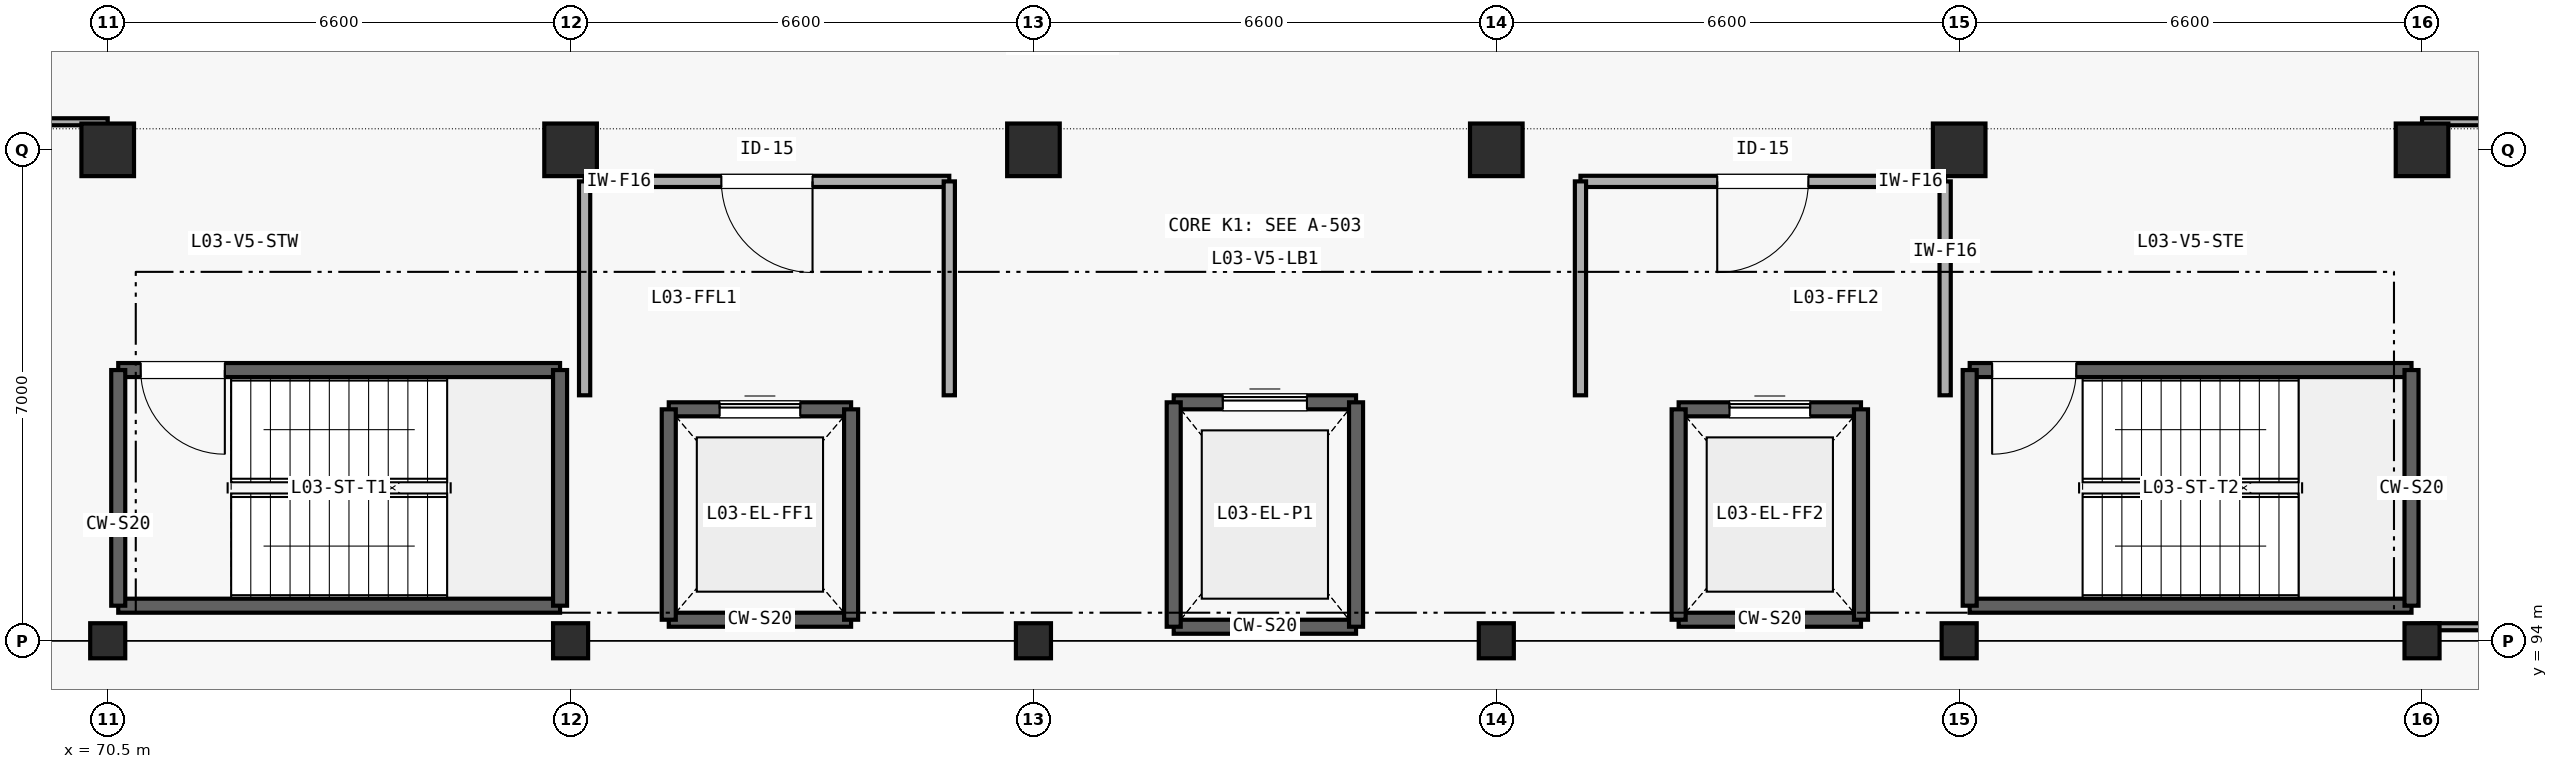
"""IFC4 building model, lengths in metres.
Left out: names, types, materials, properties, quantities, classifications, styles, units other than length and angle.
Written with IfcOpenShell. Run it as: python <this file> out.ifc"""

import sys

from ifc_helpers import new_model, si_unit, direction, frame, frame_2d, origin, origin_2d, place, context, subcontext, project, spatial, rectangle, extrude, element, fill, save


model = new_model("IFC4")
c1 = context("Model", 3, precision=1e-05, world=origin(), true_north=direction((0.0, 1.0)))
c2 = subcontext(c1, "Body", "Model", "MODEL_VIEW")
j1 = project(units=[si_unit("LENGTHUNIT", "METRE"), si_unit("PLANEANGLEUNIT", "RADIAN")], contexts=[c1])
p1 = place(None, origin())
s1 = spatial("IfcSite", under=j1, at=p1, CompositionType="ELEMENT")
p2 = place(p1, origin())
s2 = spatial("IfcBuilding", under=s1, at=p2, CompositionType="ELEMENT")
p3 = place(p2, frame((0.0, 0.0, 12.6)))
s3 = spatial("IfcBuildingStorey", under=s2, at=p3, CompositionType="ELEMENT", Elevation=12.6)
p4 = place(p3, frame((70.5, 94.0, 0.0), z_axis=(0.0, 0.0, 1.0), x_axis=(1.0, 0.0, 0.0)))
e1 = element("IfcColumn", 1, at=p4, inside=s3, PredefinedType="COLUMN", context=c2, shape_type="SweptSolid", body=[
    extrude(rectangle(XDim=0.5, YDim=0.5, at=origin_2d()), origin(), (0.0, 0.0, 1.0), 4.2),
])
p5 = place(p3, frame((70.5, 101.0, 0.0), z_axis=(0.0, 0.0, 1.0), x_axis=(1.0, 0.0, 0.0)))
e2 = element("IfcColumn", 2, at=p5, inside=s3, PredefinedType="COLUMN", context=c2, shape_type="SweptSolid", body=[
    extrude(rectangle(XDim=0.75, YDim=0.75, at=origin_2d()), origin(), (0.0, 0.0, 1.0), 4.2),
])
p6 = place(p3, frame((77.1, 94.0, 0.0), z_axis=(0.0, 0.0, 1.0), x_axis=(1.0, 0.0, 0.0)))
e3 = element("IfcColumn", 3, at=p6, inside=s3, PredefinedType="COLUMN", context=c2, shape_type="SweptSolid", body=[
    extrude(rectangle(XDim=0.5, YDim=0.5, at=origin_2d()), origin(), (0.0, 0.0, 1.0), 4.2),
])
p7 = place(p3, frame((77.1, 101.0, 0.0), z_axis=(0.0, 0.0, 1.0), x_axis=(1.0, 0.0, 0.0)))
e4 = element("IfcColumn", 4, at=p7, inside=s3, PredefinedType="COLUMN", context=c2, shape_type="SweptSolid", body=[
    extrude(rectangle(XDim=0.75, YDim=0.75, at=origin_2d()), origin(), (0.0, 0.0, 1.0), 4.2),
])
p8 = place(p3, frame((83.7, 94.0, 0.0), z_axis=(0.0, 0.0, 1.0), x_axis=(1.0, 0.0, 0.0)))
e5 = element("IfcColumn", 5, at=p8, inside=s3, PredefinedType="COLUMN", context=c2, shape_type="SweptSolid", body=[
    extrude(rectangle(XDim=0.5, YDim=0.5, at=origin_2d()), origin(), (0.0, 0.0, 1.0), 4.2),
])
p9 = place(p3, frame((83.7, 101.0, 0.0), z_axis=(0.0, 0.0, 1.0), x_axis=(1.0, 0.0, 0.0)))
e6 = element("IfcColumn", 6, at=p9, inside=s3, PredefinedType="COLUMN", context=c2, shape_type="SweptSolid", body=[
    extrude(rectangle(XDim=0.75, YDim=0.75, at=origin_2d()), origin(), (0.0, 0.0, 1.0), 4.2),
])
p10 = place(p3, frame((90.3, 94.0, 0.0), z_axis=(0.0, 0.0, 1.0), x_axis=(1.0, 0.0, 0.0)))
e7 = element("IfcColumn", 7, at=p10, inside=s3, PredefinedType="COLUMN", context=c2, shape_type="SweptSolid", body=[
    extrude(rectangle(XDim=0.5, YDim=0.5, at=origin_2d()), origin(), (0.0, 0.0, 1.0), 4.2),
])
p11 = place(p3, frame((90.3, 101.0, 0.0), z_axis=(0.0, 0.0, 1.0), x_axis=(1.0, 0.0, 0.0)))
e8 = element("IfcColumn", 8, at=p11, inside=s3, PredefinedType="COLUMN", context=c2, shape_type="SweptSolid", body=[
    extrude(rectangle(XDim=0.75, YDim=0.75, at=origin_2d()), origin(), (0.0, 0.0, 1.0), 4.2),
])
p12 = place(p3, frame((96.9, 94.0, 0.0), z_axis=(0.0, 0.0, 1.0), x_axis=(1.0, 0.0, 0.0)))
e9 = element("IfcColumn", 9, at=p12, inside=s3, PredefinedType="COLUMN", context=c2, shape_type="SweptSolid", body=[
    extrude(rectangle(XDim=0.5, YDim=0.5, at=origin_2d()), origin(), (0.0, 0.0, 1.0), 4.2),
])
p13 = place(p3, frame((96.9, 101.0, 0.0), z_axis=(0.0, 0.0, 1.0), x_axis=(1.0, 0.0, 0.0)))
e10 = element("IfcColumn", 10, at=p13, inside=s3, PredefinedType="COLUMN", context=c2, shape_type="SweptSolid", body=[
    extrude(rectangle(XDim=0.75, YDim=0.75, at=origin_2d()), origin(), (0.0, 0.0, 1.0), 4.2),
])
p14 = place(p3, frame((103.5, 94.0, 0.0), z_axis=(0.0, 0.0, 1.0), x_axis=(1.0, 0.0, 0.0)))
e11 = element("IfcColumn", 11, at=p14, inside=s3, PredefinedType="COLUMN", context=c2, shape_type="SweptSolid", body=[
    extrude(rectangle(XDim=0.5, YDim=0.5, at=origin_2d()), origin(), (0.0, 0.0, 1.0), 4.2),
])
p15 = place(p3, frame((103.5, 101.0, 0.0), z_axis=(0.0, 0.0, 1.0), x_axis=(1.0, 0.0, 0.0)))
e12 = element("IfcColumn", 12, at=p15, inside=s3, PredefinedType="COLUMN", context=c2, shape_type="SweptSolid", body=[
    extrude(rectangle(XDim=0.75, YDim=0.75, at=origin_2d()), origin(), (0.0, 0.0, 1.0), 4.2),
])
p16 = place(p3, frame((70.65, 94.5, 0.0), z_axis=(0.0, 0.0, 1.0), x_axis=(1.0, 0.0, 0.0)))
e13 = element("IfcWall", 13, at=p16, inside=s3, PredefinedType="SHEAR", context=c2, shape_type="SweptSolid", body=[
    extrude(rectangle(XDim=6.3, YDim=0.2, at=frame_2d((3.15, 0.0))), origin(), (0.0, 0.0, 1.0), 4.2),
])
p17 = place(p3, frame((70.65, 97.86, 0.0), z_axis=(0.0, 0.0, 1.0), x_axis=(1.0, 0.0, 0.0)))
e14 = element("IfcWall", 14, at=p17, inside=s3, PredefinedType="SHEAR", context=c2, shape_type="SweptSolid", body=[
    extrude(rectangle(XDim=6.3, YDim=0.2, at=frame_2d((3.15, 0.0))), origin(), (0.0, 0.0, 1.0), 4.2),
])
p18 = place(p17, frame((0.32, 0.0, 0.0)))
e15 = element("IfcOpeningElement", 15, at=p18, cuts=e14, PredefinedType="OPENING", context=c2, shape_type="SweptSolid", body=[
    extrude(rectangle(XDim=1.2, YDim=2.15, at=frame_2d((0.6, 1.075))), frame((0.0, 0.11, 0.0), z_axis=(0.0, -1.0, 0.0), x_axis=(1.0, 0.0, 0.0)), (0.0, 0.0, 1.0), 0.22),
])
for number, where, z_axis, x_axis in (
    (16, (70.65, 94.5, 0.0), (0.0, 0.0, 1.0), (0.0, 1.0, 0.0)),
    (17, (76.95, 94.5, 0.0), (0.0, 0.0, 1.0), (0.0, 1.0, 0.0)),
):
    element("IfcWall", number, at=place(p3, frame(where, z_axis=z_axis, x_axis=x_axis)), inside=s3, PredefinedType="SHEAR", context=c2, shape_type="SweptSolid", body=[
        extrude(rectangle(XDim=3.36, YDim=0.2, at=frame_2d((1.68, 0.0))), origin(), (0.0, 0.0, 1.0), 4.2),
    ])
p19 = place(p3, frame((97.05, 94.5, 0.0), z_axis=(0.0, 0.0, 1.0), x_axis=(1.0, 0.0, 0.0)))
e18 = element("IfcWall", 18, at=p19, inside=s3, PredefinedType="SHEAR", context=c2, shape_type="SweptSolid", body=[
    extrude(rectangle(XDim=6.3, YDim=0.2, at=frame_2d((3.15, 0.0))), origin(), (0.0, 0.0, 1.0), 4.2),
])
p20 = place(p3, frame((97.05, 97.86, 0.0), z_axis=(0.0, 0.0, 1.0), x_axis=(1.0, 0.0, 0.0)))
e19 = element("IfcWall", 19, at=p20, inside=s3, PredefinedType="SHEAR", context=c2, shape_type="SweptSolid", body=[
    extrude(rectangle(XDim=6.3, YDim=0.2, at=frame_2d((3.15, 0.0))), origin(), (0.0, 0.0, 1.0), 4.2),
])
p21 = place(p20, frame((0.32, 0.0, 0.0)))
e20 = element("IfcOpeningElement", 20, at=p21, cuts=e19, PredefinedType="OPENING", context=c2, shape_type="SweptSolid", body=[
    extrude(rectangle(XDim=1.2, YDim=2.15, at=frame_2d((0.6, 1.075))), frame((0.0, 0.11, 0.0), z_axis=(0.0, -1.0, 0.0), x_axis=(1.0, 0.0, 0.0)), (0.0, 0.0, 1.0), 0.22),
])
for number, where, z_axis, x_axis in (
    (21, (97.05, 94.5, 0.0), (0.0, 0.0, 1.0), (0.0, 1.0, 0.0)),
    (22, (103.35, 94.5, 0.0), (0.0, 0.0, 1.0), (0.0, 1.0, 0.0)),
):
    element("IfcWall", number, at=place(p3, frame(where, z_axis=z_axis, x_axis=x_axis)), inside=s3, PredefinedType="SHEAR", context=c2, shape_type="SweptSolid", body=[
        extrude(rectangle(XDim=3.36, YDim=0.2, at=frame_2d((1.68, 0.0))), origin(), (0.0, 0.0, 1.0), 4.2),
    ])
p22 = place(p3, frame((78.5, 94.3, 0.0), z_axis=(0.0, 0.0, 1.0), x_axis=(1.0, 0.0, 0.0)))
e23 = element("IfcWall", 23, at=p22, inside=s3, PredefinedType="SHEAR", context=c2, shape_type="SweptSolid", body=[
    extrude(rectangle(XDim=2.6, YDim=0.2, at=frame_2d((1.3, 0.0))), origin(), (0.0, 0.0, 1.0), 4.2),
])
p23 = place(p3, frame((78.5, 97.3, 0.0), z_axis=(0.0, 0.0, 1.0), x_axis=(1.0, 0.0, 0.0)))
e24 = element("IfcWall", 24, at=p23, inside=s3, PredefinedType="SHEAR", context=c2, shape_type="SweptSolid", body=[
    extrude(rectangle(XDim=2.6, YDim=0.2, at=frame_2d((1.3, 0.0))), origin(), (0.0, 0.0, 1.0), 4.2),
])
p24 = place(p23, frame((0.725, 0.0, 0.0)))
e25 = element("IfcOpeningElement", 25, at=p24, cuts=e24, PredefinedType="OPENING", context=c2, shape_type="SweptSolid", body=[
    extrude(rectangle(XDim=1.15, YDim=2.2, at=frame_2d((0.575, 1.1))), frame((0.0, 0.11, 0.0), z_axis=(0.0, -1.0, 0.0), x_axis=(1.0, 0.0, 0.0)), (0.0, 0.0, 1.0), 0.22),
])
for number, where, z_axis, x_axis in (
    (26, (78.5, 94.3, 0.0), (0.0, 0.0, 1.0), (0.0, 1.0, 0.0)),
    (27, (81.1, 94.3, 0.0), (0.0, 0.0, 1.0), (0.0, 1.0, 0.0)),
):
    element("IfcWall", number, at=place(p3, frame(where, z_axis=z_axis, x_axis=x_axis)), inside=s3, PredefinedType="SHEAR", context=c2, shape_type="SweptSolid", body=[
        extrude(rectangle(XDim=3.0, YDim=0.2, at=frame_2d((1.5, 0.0))), origin(), (0.0, 0.0, 1.0), 4.2),
    ])
p25 = place(p3, frame((92.9, 94.3, 0.0), z_axis=(0.0, 0.0, 1.0), x_axis=(1.0, 0.0, 0.0)))
e28 = element("IfcWall", 28, at=p25, inside=s3, PredefinedType="SHEAR", context=c2, shape_type="SweptSolid", body=[
    extrude(rectangle(XDim=2.6, YDim=0.2, at=frame_2d((1.3, 0.0))), origin(), (0.0, 0.0, 1.0), 4.2),
])
p26 = place(p3, frame((92.9, 97.3, 0.0), z_axis=(0.0, 0.0, 1.0), x_axis=(1.0, 0.0, 0.0)))
e29 = element("IfcWall", 29, at=p26, inside=s3, PredefinedType="SHEAR", context=c2, shape_type="SweptSolid", body=[
    extrude(rectangle(XDim=2.6, YDim=0.2, at=frame_2d((1.3, 0.0))), origin(), (0.0, 0.0, 1.0), 4.2),
])
p27 = place(p26, frame((0.725, 0.0, 0.0)))
e30 = element("IfcOpeningElement", 30, at=p27, cuts=e29, PredefinedType="OPENING", context=c2, shape_type="SweptSolid", body=[
    extrude(rectangle(XDim=1.15, YDim=2.2, at=frame_2d((0.575, 1.1))), frame((0.0, 0.11, 0.0), z_axis=(0.0, -1.0, 0.0), x_axis=(1.0, 0.0, 0.0)), (0.0, 0.0, 1.0), 0.22),
])
for number, where, z_axis, x_axis in (
    (31, (92.9, 94.3, 0.0), (0.0, 0.0, 1.0), (0.0, 1.0, 0.0)),
    (32, (95.5, 94.3, 0.0), (0.0, 0.0, 1.0), (0.0, 1.0, 0.0)),
):
    element("IfcWall", number, at=place(p3, frame(where, z_axis=z_axis, x_axis=x_axis)), inside=s3, PredefinedType="SHEAR", context=c2, shape_type="SweptSolid", body=[
        extrude(rectangle(XDim=3.0, YDim=0.2, at=frame_2d((1.5, 0.0))), origin(), (0.0, 0.0, 1.0), 4.2),
    ])
p28 = place(p3, frame((85.7, 94.2, 0.0), z_axis=(0.0, 0.0, 1.0), x_axis=(1.0, 0.0, 0.0)))
e33 = element("IfcWall", 33, at=p28, inside=s3, PredefinedType="SHEAR", context=c2, shape_type="SweptSolid", body=[
    extrude(rectangle(XDim=2.6, YDim=0.2, at=frame_2d((1.3, 0.0))), origin(), (0.0, 0.0, 1.0), 4.2),
])
p29 = place(p3, frame((85.7, 97.4, 0.0), z_axis=(0.0, 0.0, 1.0), x_axis=(1.0, 0.0, 0.0)))
e34 = element("IfcWall", 34, at=p29, inside=s3, PredefinedType="SHEAR", context=c2, shape_type="SweptSolid", body=[
    extrude(rectangle(XDim=2.6, YDim=0.2, at=frame_2d((1.3, 0.0))), origin(), (0.0, 0.0, 1.0), 4.2),
])
p30 = place(p29, frame((0.7, 0.0, 0.0)))
e35 = element("IfcOpeningElement", 35, at=p30, cuts=e34, PredefinedType="OPENING", context=c2, shape_type="SweptSolid", body=[
    extrude(rectangle(XDim=1.2, YDim=2.2, at=frame_2d((0.6, 1.1))), frame((0.0, 0.11, 0.0), z_axis=(0.0, -1.0, 0.0), x_axis=(1.0, 0.0, 0.0)), (0.0, 0.0, 1.0), 0.22),
])
for number, where, z_axis, x_axis in (
    (36, (85.7, 94.2, 0.0), (0.0, 0.0, 1.0), (0.0, 1.0, 0.0)),
    (37, (88.3, 94.2, 0.0), (0.0, 0.0, 1.0), (0.0, 1.0, 0.0)),
):
    element("IfcWall", number, at=place(p3, frame(where, z_axis=z_axis, x_axis=x_axis)), inside=s3, PredefinedType="SHEAR", context=c2, shape_type="SweptSolid", body=[
        extrude(rectangle(XDim=3.2, YDim=0.2, at=frame_2d((1.6, 0.0))), origin(), (0.0, 0.0, 1.0), 4.2),
    ])
p31 = place(p3, frame((77.3, 100.55, 0.0), z_axis=(0.0, 0.0, 1.0), x_axis=(1.0, 0.0, 0.0)))
e38 = element("IfcWall", 38, at=p31, inside=s3, PredefinedType="SOLIDWALL", context=c2, shape_type="SweptSolid", body=[
    extrude(rectangle(XDim=5.2, YDim=0.16, at=frame_2d((2.6, 0.0))), origin(), (0.0, 0.0, 1.0), 3.9),
])
p32 = place(p31, frame((1.95, 0.0, 0.0)))
e39 = element("IfcOpeningElement", 39, at=p32, cuts=e38, PredefinedType="OPENING", context=c2, shape_type="SweptSolid", body=[
    extrude(rectangle(XDim=1.3, YDim=2.15, at=frame_2d((0.65, 1.075))), frame((0.0, 0.09, 0.0), z_axis=(0.0, -1.0, 0.0), x_axis=(1.0, 0.0, 0.0)), (0.0, 0.0, 1.0), 0.18),
])
p33 = place(p3, frame((77.3, 97.5, 0.0), z_axis=(0.0, 0.0, 1.0), x_axis=(0.0, 1.0, 0.0)))
e40 = element("IfcWall", 40, at=p33, inside=s3, PredefinedType="SOLIDWALL", context=c2, shape_type="SweptSolid", body=[
    extrude(rectangle(XDim=3.05, YDim=0.16, at=frame_2d((1.525, 0.0))), origin(), (0.0, 0.0, 1.0), 3.405),
])
p34 = place(p3, frame((82.5, 97.5, 0.0), z_axis=(0.0, 0.0, 1.0), x_axis=(0.0, 1.0, 0.0)))
e41 = element("IfcWall", 41, at=p34, inside=s3, PredefinedType="SOLIDWALL", context=c2, shape_type="SweptSolid", body=[
    extrude(rectangle(XDim=3.05, YDim=0.16, at=frame_2d((1.525, 0.0))), origin(), (0.0, 0.0, 1.0), 3.9),
])
p35 = place(p3, frame((91.5, 100.55, 0.0), z_axis=(0.0, 0.0, 1.0), x_axis=(1.0, 0.0, 0.0)))
e42 = element("IfcWall", 42, at=p35, inside=s3, PredefinedType="SOLIDWALL", context=c2, shape_type="SweptSolid", body=[
    extrude(rectangle(XDim=5.2, YDim=0.16, at=frame_2d((2.6, 0.0))), origin(), (0.0, 0.0, 1.0), 3.9),
])
p36 = place(p35, frame((1.95, 0.0, 0.0)))
e43 = element("IfcOpeningElement", 43, at=p36, cuts=e42, PredefinedType="OPENING", context=c2, shape_type="SweptSolid", body=[
    extrude(rectangle(XDim=1.3, YDim=2.15, at=frame_2d((0.65, 1.075))), frame((0.0, 0.09, 0.0), z_axis=(0.0, -1.0, 0.0), x_axis=(1.0, 0.0, 0.0)), (0.0, 0.0, 1.0), 0.18),
])
p37 = place(p3, frame((91.5, 97.5, 0.0), z_axis=(0.0, 0.0, 1.0), x_axis=(0.0, 1.0, 0.0)))
e44 = element("IfcWall", 44, at=p37, inside=s3, PredefinedType="SOLIDWALL", context=c2, shape_type="SweptSolid", body=[
    extrude(rectangle(XDim=3.05, YDim=0.16, at=frame_2d((1.525, 0.0))), origin(), (0.0, 0.0, 1.0), 3.9),
])
p38 = place(p3, frame((96.7, 97.5, 0.0), z_axis=(0.0, 0.0, 1.0), x_axis=(0.0, 1.0, 0.0)))
e45 = element("IfcWall", 45, at=p38, inside=s3, PredefinedType="SOLIDWALL", context=c2, shape_type="SweptSolid", body=[
    extrude(rectangle(XDim=3.05, YDim=0.16, at=frame_2d((1.525, 0.0))), origin(), (0.0, 0.0, 1.0), 3.405),
])
p39 = place(p3, frame((57.5, 101.4, 0.0), z_axis=(0.0, 0.0, 1.0), x_axis=(1.0, 0.0, 0.0)))
e46 = element("IfcWall", 46, at=p39, inside=s3, PredefinedType="PARTITIONING", context=c2, shape_type="SweptSolid", body=[
    extrude(rectangle(XDim=13.0, YDim=0.1, at=frame_2d((6.5, 0.0))), origin(), (0.0, 0.0, 1.0), 3.9),
])
p40 = place(p39, frame((8.025, 0.0, 0.0)))
e47 = element("IfcOpeningElement", 47, at=p40, cuts=e46, PredefinedType="OPENING", context=c2, shape_type="SweptSolid", body=[
    extrude(rectangle(XDim=0.95, YDim=2.1, at=frame_2d((0.475, 1.05))), frame((0.0, 0.06, 0.0), z_axis=(0.0, -1.0, 0.0), x_axis=(1.0, 0.0, 0.0)), (0.0, 0.0, 1.0), 0.12),
])
p41 = place(p3, frame((103.5, 94.2, 0.0), z_axis=(0.0, 0.0, 1.0), x_axis=(1.0, 0.0, 0.0)))
e48 = element("IfcWall", 48, at=p41, inside=s3, PredefinedType="PARTITIONING", context=c2, shape_type="SweptSolid", body=[
    extrude(rectangle(XDim=6.4, YDim=0.1, at=frame_2d((3.2, 0.0))), origin(), (0.0, 0.0, 1.0), 3.405),
])
p42 = place(p3, frame((103.5, 101.4, 0.0), z_axis=(0.0, 0.0, 1.0), x_axis=(1.0, 0.0, 0.0)))
e49 = element("IfcWall", 49, at=p42, inside=s3, PredefinedType="PARTITIONING", context=c2, shape_type="SweptSolid", body=[
    extrude(rectangle(XDim=6.4, YDim=0.1, at=frame_2d((3.2, 0.0))), origin(), (0.0, 0.0, 1.0), 3.135),
])
p43 = place(p42, frame((2.7, 0.0, 0.0)))
e50 = element("IfcOpeningElement", 50, at=p43, cuts=e49, PredefinedType="OPENING", context=c2, shape_type="SweptSolid", body=[
    extrude(rectangle(XDim=1.0, YDim=2.1, at=frame_2d((0.5, 1.05))), frame((0.0, 0.06, 0.0), z_axis=(0.0, -1.0, 0.0), x_axis=(1.0, 0.0, 0.0)), (0.0, 0.0, 1.0), 0.12),
])
p44 = place(p18, frame((1.2, 0.0, 0.0), z_axis=(0.0, 0.0, 1.0), x_axis=(-1.0, 0.0, 0.0)))
e51 = element("IfcDoor", 51, at=p44, inside=s3, OperationType="SINGLE_SWING_LEFT", PredefinedType="DOOR", context=c2, shape_type="SweptSolid", body=[
    extrude(rectangle(XDim=1.2, YDim=2.15, at=frame_2d((0.6, 1.075))), frame((0.0, 0.025, 0.0), z_axis=(0.0, -1.0, 0.0), x_axis=(1.0, 0.0, 0.0)), (0.0, 0.0, 1.0), 0.05),
])
fill(e15, e51)
p45 = place(p21, frame((1.2, 0.0, 0.0), z_axis=(0.0, 0.0, 1.0), x_axis=(-1.0, 0.0, 0.0)))
e52 = element("IfcDoor", 52, at=p45, inside=s3, OperationType="SINGLE_SWING_RIGHT", PredefinedType="DOOR", context=c2, shape_type="SweptSolid", body=[
    extrude(rectangle(XDim=1.2, YDim=2.15, at=frame_2d((0.6, 1.075))), frame((0.0, 0.025, 0.0), z_axis=(0.0, -1.0, 0.0), x_axis=(1.0, 0.0, 0.0)), (0.0, 0.0, 1.0), 0.05),
])
fill(e20, e52)
p46 = place(p24, origin())
e53 = element("IfcDoor", 53, at=p46, inside=s3, OperationType="SLIDING_TO_LEFT", PredefinedType="DOOR", context=c2, shape_type="SweptSolid", body=[
    extrude(rectangle(XDim=1.15, YDim=2.2, at=frame_2d((0.575, 1.1))), frame((0.0, 0.025, 0.0), z_axis=(0.0, -1.0, 0.0), x_axis=(1.0, 0.0, 0.0)), (0.0, 0.0, 1.0), 0.05),
])
fill(e25, e53)
p47 = place(p27, origin())
e54 = element("IfcDoor", 54, at=p47, inside=s3, OperationType="SLIDING_TO_LEFT", PredefinedType="DOOR", context=c2, shape_type="SweptSolid", body=[
    extrude(rectangle(XDim=1.15, YDim=2.2, at=frame_2d((0.575, 1.1))), frame((0.0, 0.025, 0.0), z_axis=(0.0, -1.0, 0.0), x_axis=(1.0, 0.0, 0.0)), (0.0, 0.0, 1.0), 0.05),
])
fill(e30, e54)
p48 = place(p30, origin())
e55 = element("IfcDoor", 55, at=p48, inside=s3, OperationType="SLIDING_TO_LEFT", PredefinedType="DOOR", context=c2, shape_type="SweptSolid", body=[
    extrude(rectangle(XDim=1.2, YDim=2.2, at=frame_2d((0.6, 1.1))), frame((0.0, 0.025, 0.0), z_axis=(0.0, -1.0, 0.0), x_axis=(1.0, 0.0, 0.0)), (0.0, 0.0, 1.0), 0.05),
])
fill(e35, e55)
p49 = place(p32, frame((1.3, 0.0, 0.0), z_axis=(0.0, 0.0, 1.0), x_axis=(-1.0, 0.0, 0.0)))
e56 = element("IfcDoor", 56, at=p49, inside=s3, OperationType="SINGLE_SWING_LEFT", PredefinedType="DOOR", context=c2, shape_type="SweptSolid", body=[
    extrude(rectangle(XDim=1.3, YDim=2.15, at=frame_2d((0.65, 1.075))), frame((0.0, 0.025, 0.0), z_axis=(0.0, -1.0, 0.0), x_axis=(1.0, 0.0, 0.0)), (0.0, 0.0, 1.0), 0.05),
])
fill(e39, e56)
p50 = place(p36, frame((1.3, 0.0, 0.0), z_axis=(0.0, 0.0, 1.0), x_axis=(-1.0, 0.0, 0.0)))
e57 = element("IfcDoor", 57, at=p50, inside=s3, OperationType="SINGLE_SWING_RIGHT", PredefinedType="DOOR", context=c2, shape_type="SweptSolid", body=[
    extrude(rectangle(XDim=1.3, YDim=2.15, at=frame_2d((0.65, 1.075))), frame((0.0, 0.025, 0.0), z_axis=(0.0, -1.0, 0.0), x_axis=(1.0, 0.0, 0.0)), (0.0, 0.0, 1.0), 0.05),
])
fill(e43, e57)
save(model, sys.argv[1])
